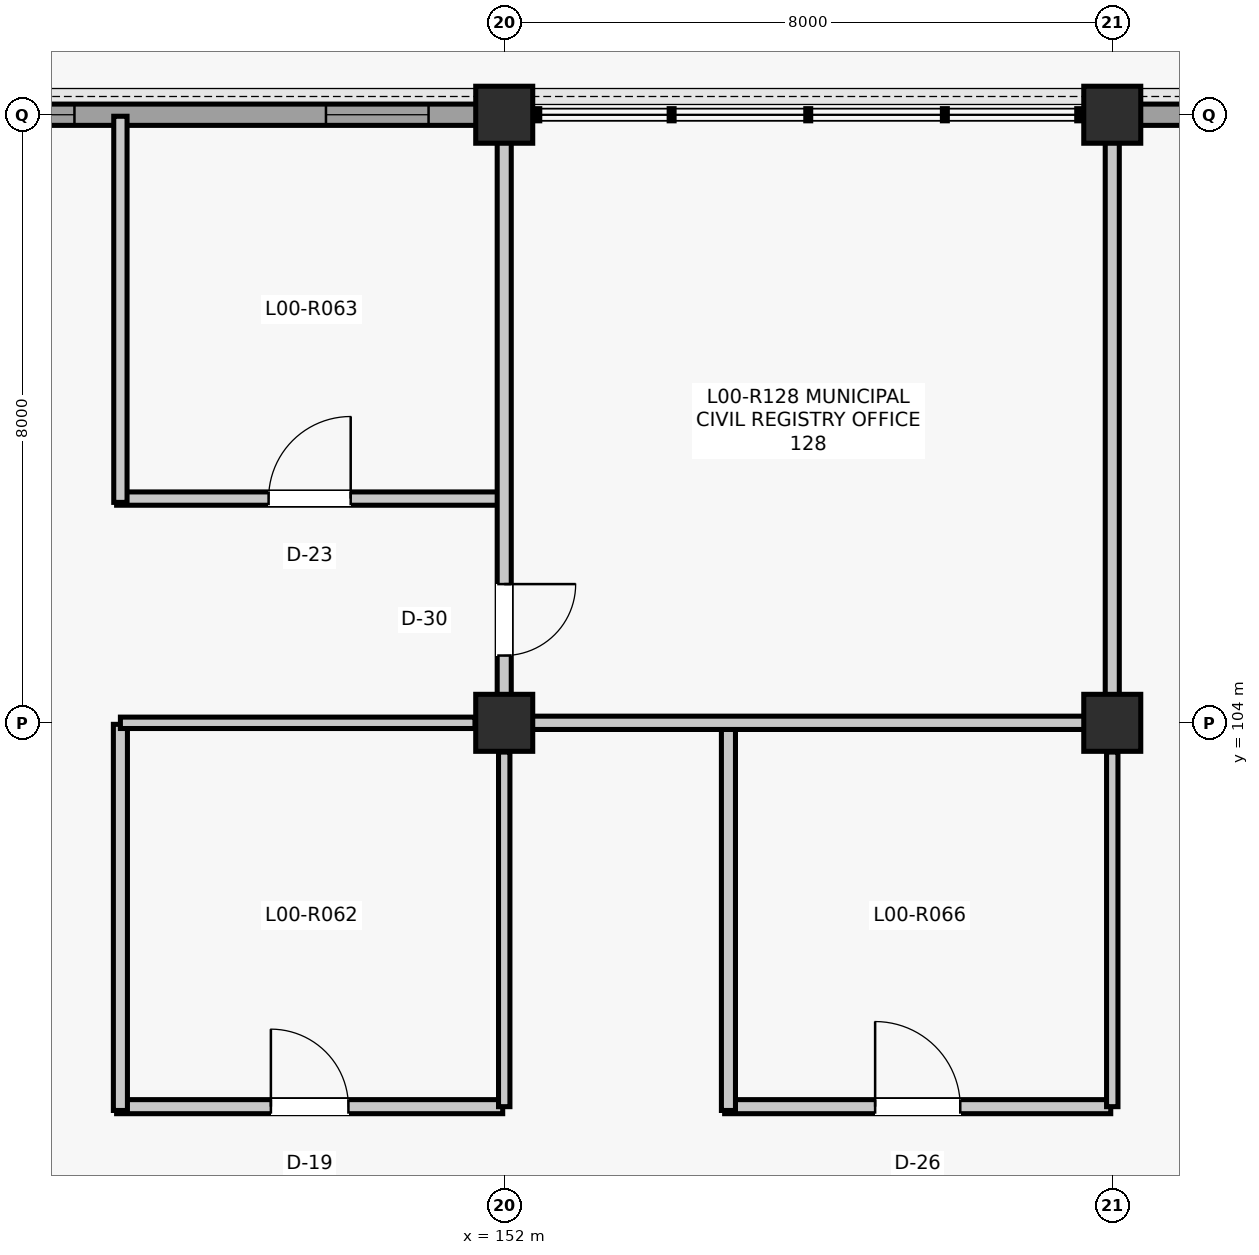
"""IFC4 building model, lengths in metres.
Left out: names, types, materials, properties, quantities, classifications, styles, units other than length and angle.
Written with IfcOpenShell. Run it as: python <this file> out.ifc"""

import sys

from ifc_helpers import new_model, si_unit, direction, frame, frame_2d, origin, origin_2d, place, context, subcontext, project, spatial, rectangle, extrude, element, fill, save


model = new_model("IFC4")
c1 = context("Model", 3, precision=1e-05, world=origin(), true_north=direction((0.0, 1.0)))
c2 = subcontext(c1, "Body", "Model", "MODEL_VIEW")
j1 = project(units=[si_unit("LENGTHUNIT", "METRE"), si_unit("PLANEANGLEUNIT", "RADIAN")], contexts=[c1])
p1 = place(None, origin())
s1 = spatial("IfcSite", under=j1, at=p1, CompositionType="ELEMENT")
p2 = place(p1, origin())
s2 = spatial("IfcBuilding", under=s1, at=p2, CompositionType="ELEMENT")
p3 = place(p2, origin())
s3 = spatial("IfcBuildingStorey", under=s2, at=p3, CompositionType="ELEMENT", Elevation=0.0)
for number, where, z_axis, x_axis in (
    (1, (152.0, 104.0, 0.0), (0.0, 0.0, 1.0), (1.0, 0.0, 0.0)),
    (2, (152.0, 112.0, 0.0), (0.0, 0.0, 1.0), (1.0, 0.0, 0.0)),
    (3, (160.0, 104.0, 0.0), (0.0, 0.0, 1.0), (1.0, 0.0, 0.0)),
    (4, (160.0, 112.0, 0.0), (0.0, 0.0, 1.0), (1.0, 0.0, 0.0)),
):
    element("IfcColumn", number, at=place(p3, frame(where, z_axis=z_axis, x_axis=x_axis)), inside=s3, PredefinedType="COLUMN", context=c2, shape_type="SweptSolid", body=[
        extrude(rectangle(XDim=0.75, YDim=0.75, at=origin_2d()), origin(), (0.0, 0.0, 1.0), 5.28),
    ])
p4 = place(p3, frame((144.36, 112.0, 0.0), z_axis=(0.0, 0.0, 1.0), x_axis=(1.0, 0.0, 0.0)))
e5 = element("IfcWall", 5, at=p4, inside=s3, PredefinedType="SOLIDWALL", context=c2, shape_type="SweptSolid", body=[
    extrude(rectangle(XDim=7.28, YDim=0.28, at=frame_2d((3.64, 0.0))), origin(), (0.0, 0.0, 1.0), 4.61),
])
p5 = place(p4, frame((0.635, 0.0, 0.95)))
e6 = element("IfcOpeningElement", 6, at=p5, cuts=e5, PredefinedType="OPENING", context=c2, shape_type="SweptSolid", body=[
    extrude(rectangle(XDim=1.35, YDim=1.9, at=frame_2d((0.675, 0.95))), frame((0.0, 0.15, 0.0), z_axis=(0.0, -1.0, 0.0), x_axis=(1.0, 0.0, 0.0)), (0.0, 0.0, 1.0), 0.3),
])
p6 = place(p4, frame((5.295, 0.0, 0.95)))
e7 = element("IfcOpeningElement", 7, at=p6, cuts=e5, PredefinedType="OPENING", context=c2, shape_type="SweptSolid", body=[
    extrude(rectangle(XDim=1.35, YDim=1.9, at=frame_2d((0.675, 0.95))), frame((0.0, 0.15, 0.0), z_axis=(0.0, -1.0, 0.0), x_axis=(1.0, 0.0, 0.0)), (0.0, 0.0, 1.0), 0.3),
])
p7 = place(p3, frame((160.36, 112.0, 0.0), z_axis=(0.0, 0.0, 1.0), x_axis=(1.0, 0.0, 0.0)))
e8 = element("IfcWall", 8, at=p7, inside=s3, PredefinedType="SOLIDWALL", context=c2, shape_type="SweptSolid", body=[
    extrude(rectangle(XDim=7.28, YDim=0.28, at=frame_2d((3.64, 0.0))), origin(), (0.0, 0.0, 1.0), 4.614),
])
p8 = place(p7, frame((2.54, 0.0, 0.0)))
e9 = element("IfcOpeningElement", 9, at=p8, cuts=e8, PredefinedType="OPENING", context=c2, shape_type="SweptSolid", body=[
    extrude(rectangle(XDim=2.2, YDim=2.5, at=frame_2d((1.1, 1.25))), frame((0.0, 0.15, 0.0), z_axis=(0.0, -1.0, 0.0), x_axis=(1.0, 0.0, 0.0)), (0.0, 0.0, 1.0), 0.3),
])
p9 = place(p3, frame((146.9, 98.95, 0.0), z_axis=(0.0, 0.0, 1.0), x_axis=(1.0, 0.0, 0.0)))
e10 = element("IfcWall", 10, at=p9, inside=s3, PredefinedType="PARTITIONING", context=c2, shape_type="SweptSolid", body=[
    extrude(rectangle(XDim=5.08, YDim=0.185, at=frame_2d((2.54, 0.0))), origin(), (0.0, 0.0, 1.0), 4.471),
])
p10 = place(p9, frame((2.03, 0.0, 0.0)))
e11 = element("IfcOpeningElement", 11, at=p10, cuts=e10, PredefinedType="OPENING", context=c2, shape_type="SweptSolid", body=[
    extrude(rectangle(XDim=1.02, YDim=2.2, at=frame_2d((0.51, 1.1))), frame((0.0, 0.103, 0.0), z_axis=(0.0, -1.0, 0.0), x_axis=(1.0, 0.0, 0.0)), (0.0, 0.0, 1.0), 0.205),
])
p11 = place(p3, frame((146.95, 98.9, 0.0), z_axis=(0.0, 0.0, 1.0), x_axis=(0.0, 1.0, 0.0)))
e12 = element("IfcWall", 12, at=p11, inside=s3, PredefinedType="PARTITIONING", context=c2, shape_type="SweptSolid", body=[
    extrude(rectangle(XDim=5.08, YDim=0.185, at=frame_2d((2.54, 0.0))), origin(), (0.0, 0.0, 1.0), 4.404),
])
p12 = place(p3, frame((146.95, 104.0, 0.0), z_axis=(0.0, 0.0, 1.0), x_axis=(1.0, 0.0, 0.0)))
e13 = element("IfcWall", 13, at=p12, inside=s3, PredefinedType="PARTITIONING", context=c2, shape_type="SweptSolid", body=[
    extrude(rectangle(XDim=4.665, YDim=0.15, at=frame_2d((2.333, 0.0))), origin(), (0.0, 0.0, 1.0), 4.404),
])
p13 = place(p3, frame((152.0, 98.95, 0.0), z_axis=(0.0, 0.0, 1.0), x_axis=(0.0, 1.0, 0.0)))
e14 = element("IfcWall", 14, at=p13, inside=s3, PredefinedType="PARTITIONING", context=c2, shape_type="SweptSolid", body=[
    extrude(rectangle(XDim=4.665, YDim=0.15, at=frame_2d((2.333, 0.0))), origin(), (0.0, 0.0, 1.0), 4.471),
])
p14 = place(p3, frame((146.9, 106.95, 0.0), z_axis=(0.0, 0.0, 1.0), x_axis=(1.0, 0.0, 0.0)))
e15 = element("IfcWall", 15, at=p14, inside=s3, PredefinedType="PARTITIONING", context=c2, shape_type="SweptSolid", body=[
    extrude(rectangle(XDim=5.08, YDim=0.175, at=frame_2d((2.54, 0.0))), origin(), (0.0, 0.0, 1.0), 4.403),
])
p15 = place(p14, frame((2.0, 0.0, 0.0)))
e16 = element("IfcOpeningElement", 16, at=p15, cuts=e15, PredefinedType="OPENING", context=c2, shape_type="SweptSolid", body=[
    extrude(rectangle(XDim=1.08, YDim=2.2, at=frame_2d((0.54, 1.1))), frame((0.0, 0.097, 0.0), z_axis=(0.0, -1.0, 0.0), x_axis=(1.0, 0.0, 0.0)), (0.0, 0.0, 1.0), 0.195),
])
p16 = place(p3, frame((146.95, 106.9, 0.0), z_axis=(0.0, 0.0, 1.0), x_axis=(0.0, 1.0, 0.0)))
e17 = element("IfcWall", 17, at=p16, inside=s3, PredefinedType="PARTITIONING", context=c2, shape_type="SweptSolid", body=[
    extrude(rectangle(XDim=5.08, YDim=0.175, at=frame_2d((2.54, 0.0))), origin(), (0.0, 0.0, 1.0), 4.603),
])
p17 = place(p3, frame((154.9, 98.95, 0.0), z_axis=(0.0, 0.0, 1.0), x_axis=(1.0, 0.0, 0.0)))
e18 = element("IfcWall", 18, at=p17, inside=s3, PredefinedType="PARTITIONING", context=c2, shape_type="SweptSolid", body=[
    extrude(rectangle(XDim=5.08, YDim=0.185, at=frame_2d((2.54, 0.0))), origin(), (0.0, 0.0, 1.0), 4.403),
])
p18 = place(p17, frame((1.98, 0.0, 0.0)))
e19 = element("IfcOpeningElement", 19, at=p18, cuts=e18, PredefinedType="OPENING", context=c2, shape_type="SweptSolid", body=[
    extrude(rectangle(XDim=1.12, YDim=2.22, at=frame_2d((0.56, 1.11))), frame((0.0, 0.103, 0.0), z_axis=(0.0, -1.0, 0.0), x_axis=(1.0, 0.0, 0.0)), (0.0, 0.0, 1.0), 0.205),
])
p19 = place(p3, frame((154.95, 98.9, 0.0), z_axis=(0.0, 0.0, 1.0), x_axis=(0.0, 1.0, 0.0)))
e20 = element("IfcWall", 20, at=p19, inside=s3, PredefinedType="PARTITIONING", context=c2, shape_type="SweptSolid", body=[
    extrude(rectangle(XDim=5.08, YDim=0.185, at=frame_2d((2.54, 0.0))), origin(), (0.0, 0.0, 1.0), 4.327),
])
p20 = place(p3, frame((160.0, 98.95, 0.0), z_axis=(0.0, 0.0, 1.0), x_axis=(0.0, 1.0, 0.0)))
e21 = element("IfcWall", 21, at=p20, inside=s3, PredefinedType="PARTITIONING", context=c2, shape_type="SweptSolid", body=[
    extrude(rectangle(XDim=4.665, YDim=0.15, at=frame_2d((2.333, 0.0))), origin(), (0.0, 0.0, 1.0), 4.403),
])
p21 = place(p3, frame((152.0, 104.365, 0.0), z_axis=(0.0, 0.0, 1.0), x_axis=(0.0, 1.0, 0.0)))
e22 = element("IfcWall", 22, at=p21, inside=s3, PredefinedType="PARTITIONING", context=c2, shape_type="SweptSolid", body=[
    extrude(rectangle(XDim=7.27, YDim=0.185, at=frame_2d((3.635, 0.0))), origin(), (0.0, 0.0, 1.0), 4.403),
])
p22 = place(p21, frame((0.52, 0.0, 0.0)))
e23 = element("IfcOpeningElement", 23, at=p22, cuts=e22, PredefinedType="OPENING", context=c2, shape_type="SweptSolid", body=[
    extrude(rectangle(XDim=0.94, YDim=2.12, at=frame_2d((0.47, 1.06))), frame((0.0, 0.103, 0.0), z_axis=(0.0, -1.0, 0.0), x_axis=(1.0, 0.0, 0.0)), (0.0, 0.0, 1.0), 0.205),
])
p23 = place(p3, frame((152.365, 104.0, 0.0), z_axis=(0.0, 0.0, 1.0), x_axis=(1.0, 0.0, 0.0)))
e24 = element("IfcWall", 24, at=p23, inside=s3, PredefinedType="PARTITIONING", context=c2, shape_type="SweptSolid", body=[
    extrude(rectangle(XDim=7.27, YDim=0.175, at=frame_2d((3.635, 0.0))), origin(), (0.0, 0.0, 1.0), 4.327),
])
p24 = place(p3, frame((160.0, 104.365, 0.0), z_axis=(0.0, 0.0, 1.0), x_axis=(0.0, 1.0, 0.0)))
e25 = element("IfcWall", 25, at=p24, inside=s3, PredefinedType="PARTITIONING", context=c2, shape_type="SweptSolid", body=[
    extrude(rectangle(XDim=7.27, YDim=0.185, at=frame_2d((3.635, 0.0))), origin(), (0.0, 0.0, 1.0), 4.412),
])
p25 = place(p5, origin())
e26 = element("IfcWindow", 26, at=p25, inside=s3, PartitioningType="SINGLE_PANEL", PredefinedType="WINDOW", context=c2, shape_type="SweptSolid", body=[
    extrude(rectangle(XDim=1.35, YDim=1.9, at=frame_2d((0.675, 0.95))), frame((0.0, 0.03, 0.0), z_axis=(0.0, -1.0, 0.0), x_axis=(1.0, 0.0, 0.0)), (0.0, 0.0, 1.0), 0.06),
])
fill(e6, e26)
p26 = place(p6, origin())
e27 = element("IfcWindow", 27, at=p26, inside=s3, PartitioningType="SINGLE_PANEL", PredefinedType="WINDOW", context=c2, shape_type="SweptSolid", body=[
    extrude(rectangle(XDim=1.35, YDim=1.9, at=frame_2d((0.675, 0.95))), frame((0.0, 0.03, 0.0), z_axis=(0.0, -1.0, 0.0), x_axis=(1.0, 0.0, 0.0)), (0.0, 0.0, 1.0), 0.06),
])
fill(e7, e27)
p27 = place(p10, origin())
e28 = element("IfcDoor", 28, at=p27, inside=s3, OperationType="SINGLE_SWING_LEFT", PredefinedType="DOOR", context=c2, shape_type="SweptSolid", body=[
    extrude(rectangle(XDim=1.02, YDim=2.2, at=frame_2d((0.51, 1.1))), frame((0.0, 0.025, 0.0), z_axis=(0.0, -1.0, 0.0), x_axis=(1.0, 0.0, 0.0)), (0.0, 0.0, 1.0), 0.05),
])
fill(e11, e28)
p28 = place(p15, origin())
e29 = element("IfcDoor", 29, at=p28, inside=s3, OperationType="SINGLE_SWING_RIGHT", PredefinedType="DOOR", context=c2, shape_type="SweptSolid", body=[
    extrude(rectangle(XDim=1.08, YDim=2.2, at=frame_2d((0.54, 1.1))), frame((0.0, 0.025, 0.0), z_axis=(0.0, -1.0, 0.0), x_axis=(1.0, 0.0, 0.0)), (0.0, 0.0, 1.0), 0.05),
])
fill(e16, e29)
p29 = place(p18, origin())
e30 = element("IfcDoor", 30, at=p29, inside=s3, OperationType="SINGLE_SWING_LEFT", PredefinedType="DOOR", context=c2, shape_type="SweptSolid", body=[
    extrude(rectangle(XDim=1.12, YDim=2.22, at=frame_2d((0.56, 1.11))), frame((0.0, 0.025, 0.0), z_axis=(0.0, -1.0, 0.0), x_axis=(1.0, 0.0, 0.0)), (0.0, 0.0, 1.0), 0.05),
])
fill(e19, e30)
p30 = place(p22, frame((0.94, 0.0, 0.0), z_axis=(0.0, 0.0, 1.0), x_axis=(-1.0, 0.0, 0.0)))
e31 = element("IfcDoor", 31, at=p30, inside=s3, OperationType="SINGLE_SWING_RIGHT", PredefinedType="DOOR", context=c2, shape_type="SweptSolid", body=[
    extrude(rectangle(XDim=0.94, YDim=2.12, at=frame_2d((0.47, 1.06))), frame((0.0, 0.025, 0.0), z_axis=(0.0, -1.0, 0.0), x_axis=(1.0, 0.0, 0.0)), (0.0, 0.0, 1.0), 0.05),
])
fill(e23, e31)
save(model, sys.argv[1])
